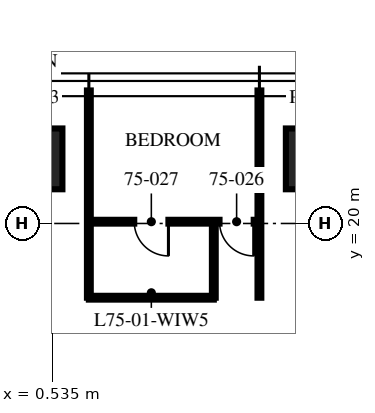
"""IFC4 building model, lengths in metres.
Left out: names, types, materials, properties, quantities, classifications, styles, units other than length and angle.
Written with IfcOpenShell. Run it as: python <this file> out.ifc"""

import sys

from ifc_helpers import new_model, si_unit, direction, frame, frame_2d, origin, origin_2d, place, context, subcontext, project, spatial, rectangle, extrude, element, fill, save


model = new_model("IFC4")
c1 = context("Model", 3, precision=1e-05, world=origin(), true_north=direction((0.0, 1.0)))
c2 = subcontext(c1, "Body", "Model", "MODEL_VIEW")
j1 = project(units=[si_unit("LENGTHUNIT", "METRE"), si_unit("PLANEANGLEUNIT", "RADIAN")], contexts=[c1])
p1 = place(None, origin())
s1 = spatial("IfcSite", under=j1, at=p1, CompositionType="ELEMENT")
p2 = place(p1, origin())
s2 = spatial("IfcBuilding", under=s1, at=p2, CompositionType="ELEMENT")
p3 = place(p2, frame((0.0, 0.0, 300.75)))
s3 = spatial("IfcBuildingStorey", under=s2, at=p3, CompositionType="ELEMENT", Elevation=300.75)
for number, where, z_axis, x_axis in (
    (1, (0.0, 21.7, 0.0), (0.0, 0.0, 1.0), (1.0, 0.0, 0.0)),
    (2, (7.48, 21.7, 0.0), (0.0, 0.0, 1.0), (1.0, 0.0, 0.0)),
):
    element("IfcColumn", number, at=place(p3, frame(where, z_axis=z_axis, x_axis=x_axis)), inside=s3, PredefinedType="COLUMN", context=c2, shape_type="SweptSolid", body=[
        extrude(rectangle(XDim=1.6, YDim=1.6, at=origin_2d()), origin(), (0.0, 0.0, 1.0), 3.75),
    ])
for number, where, z_axis, x_axis in (
    (3, (5.984, 18.046, 0.0), (0.0, 0.0, 1.0), (0.0, 1.0, 0.0)),
    (4, (1.496, 18.046, 0.0), (0.0, 0.0, 1.0), (0.0, 1.0, 0.0)),
):
    element("IfcWall", number, at=place(p3, frame(where, z_axis=z_axis, x_axis=x_axis)), inside=s3, PredefinedType="PARTITIONING", context=c2, shape_type="SweptSolid", body=[
        extrude(rectangle(XDim=5.454, YDim=0.1, at=frame_2d((2.727, 0.0))), origin(), (0.0, 0.0, 1.0), 3.01),
    ])
p4 = place(p3, frame((5.984, 20.046, 0.0), z_axis=(0.0, 0.0, 1.0), x_axis=(-1.0, 0.0, 0.0)))
e5 = element("IfcWall", 5, at=p4, inside=s3, PredefinedType="PARTITIONING", context=c2, shape_type="SweptSolid", body=[
    extrude(rectangle(XDim=4.488, YDim=0.1, at=frame_2d((2.244, 0.0))), origin(), (0.0, 0.0, 1.0), 2.91),
])
p5 = place(p4, frame((0.15, 0.0, 0.0)))
e6 = element("IfcOpeningElement", 6, at=p5, cuts=e5, PredefinedType="OPENING", context=c2, shape_type="SweptSolid", body=[
    extrude(rectangle(XDim=0.9, YDim=2.1, at=frame_2d((0.45, 1.05))), frame((0.0, 0.06, 0.0), z_axis=(0.0, -1.0, 0.0), x_axis=(1.0, 0.0, 0.0)), (0.0, 0.0, 1.0), 0.12),
])
p6 = place(p4, frame((2.394, 0.0, 0.0)))
e7 = element("IfcOpeningElement", 7, at=p6, cuts=e5, PredefinedType="OPENING", context=c2, shape_type="SweptSolid", body=[
    extrude(rectangle(XDim=0.9, YDim=2.1, at=frame_2d((0.45, 1.05))), frame((0.0, 0.06, 0.0), z_axis=(0.0, -1.0, 0.0), x_axis=(1.0, 0.0, 0.0)), (0.0, 0.0, 1.0), 0.12),
])
p7 = place(p3, frame((4.784, 18.046, 0.0), z_axis=(0.0, 0.0, 1.0), x_axis=(0.0, 1.0, 0.0)))
e8 = element("IfcWall", 8, at=p7, inside=s3, PredefinedType="PARTITIONING", context=c2, shape_type="SweptSolid", body=[
    extrude(rectangle(XDim=2.0, YDim=0.1, at=frame_2d((1.0, 0.0))), origin(), (0.0, 0.0, 1.0), 3.5),
])
p8 = place(p3, frame((4.784, 18.046, 0.0), z_axis=(0.0, 0.0, 1.0), x_axis=(-1.0, 0.0, 0.0)))
e9 = element("IfcWall", 9, at=p8, inside=s3, PredefinedType="PARTITIONING", context=c2, shape_type="SweptSolid", body=[
    extrude(rectangle(XDim=3.288, YDim=0.1, at=frame_2d((1.644, 0.0))), origin(), (0.0, 0.0, 1.0), 2.91),
])
p9 = place(p5, origin())
e10 = element("IfcDoor", 10, at=p9, inside=s3, OperationType="SINGLE_SWING_LEFT", PredefinedType="DOOR", context=c2, shape_type="SweptSolid", body=[
    extrude(rectangle(XDim=0.9, YDim=2.1, at=frame_2d((0.45, 1.05))), frame((0.0, 0.025, 0.0), z_axis=(0.0, -1.0, 0.0), x_axis=(1.0, 0.0, 0.0)), (0.0, 0.0, 1.0), 0.05),
])
fill(e6, e10)
p10 = place(p6, origin())
e11 = element("IfcDoor", 11, at=p10, inside=s3, OperationType="SINGLE_SWING_LEFT", PredefinedType="DOOR", context=c2, shape_type="SweptSolid", body=[
    extrude(rectangle(XDim=0.9, YDim=2.1, at=frame_2d((0.45, 1.05))), frame((0.0, 0.025, 0.0), z_axis=(0.0, -1.0, 0.0), x_axis=(1.0, 0.0, 0.0)), (0.0, 0.0, 1.0), 0.05),
])
fill(e7, e11)
save(model, sys.argv[1])
